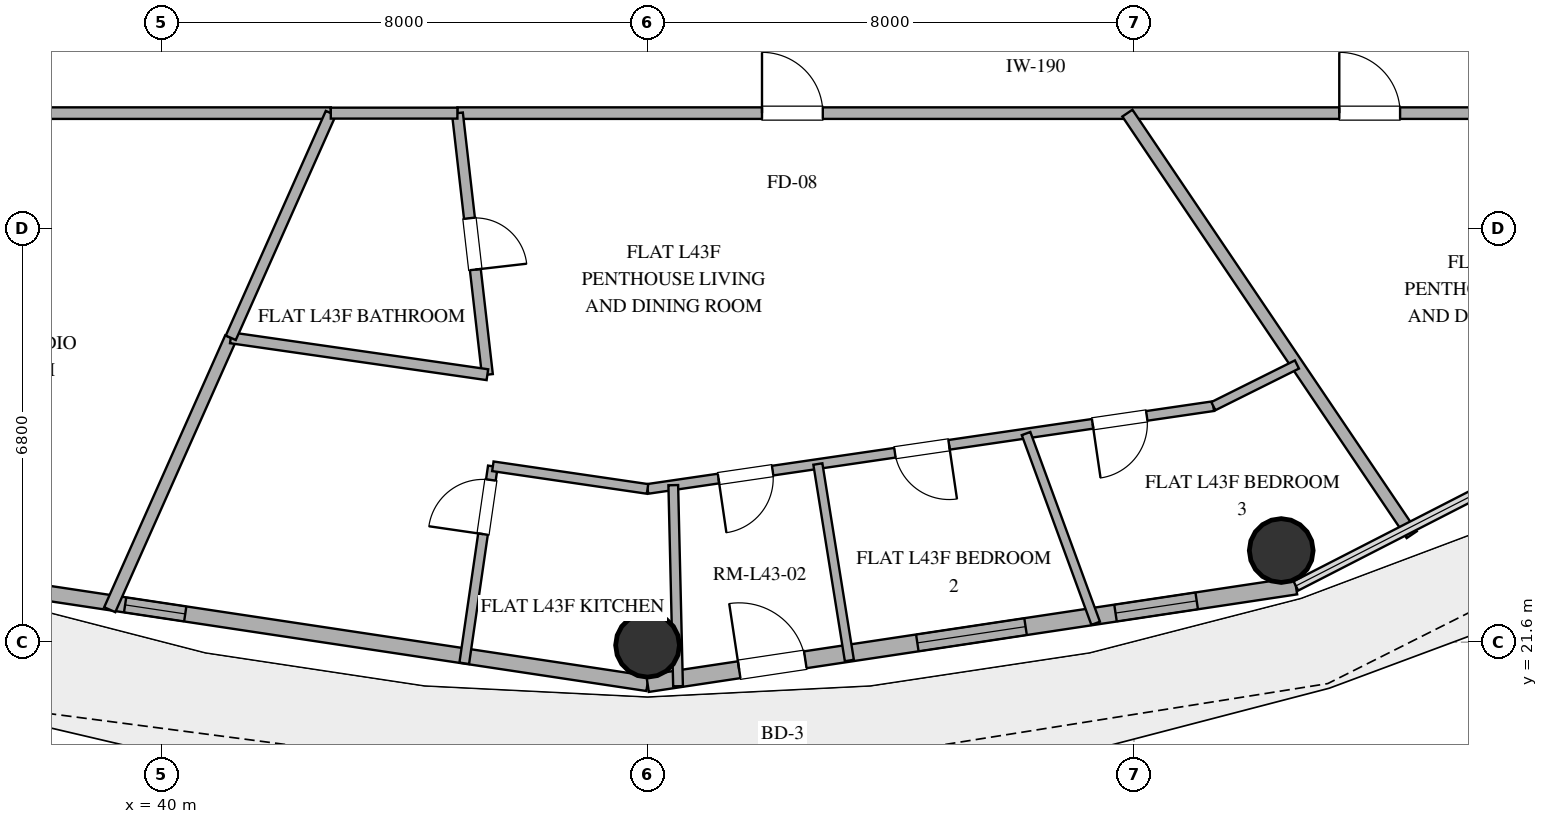
"""IFC4 building model, lengths in metres.
Left out: names, types, materials, properties, quantities, classifications, styles, units other than length and angle.
Written with IfcOpenShell. Run it as: python <this file> out.ifc"""

import sys

from ifc_helpers import new_model, si_unit, direction, frame, frame_2d, origin, origin_2d, place, context, subcontext, project, spatial, rectangle, hollow_circle, extrude, element, fill, save


model = new_model("IFC4")
c1 = context("Model", 3, precision=1e-05, world=origin(), true_north=direction((0.0, 1.0)))
c2 = subcontext(c1, "Body", "Model", "MODEL_VIEW")
j1 = project(units=[si_unit("LENGTHUNIT", "METRE"), si_unit("PLANEANGLEUNIT", "RADIAN")], contexts=[c1])
p1 = place(None, origin())
s1 = spatial("IfcSite", under=j1, at=p1, CompositionType="ELEMENT")
p2 = place(p1, origin())
s2 = spatial("IfcBuilding", under=s1, at=p2, CompositionType="ELEMENT")
p3 = place(p2, frame((0.0, 0.0, 172.2)))
s3 = spatial("IfcBuildingStorey", under=s2, at=p3, CompositionType="ELEMENT", Elevation=172.2)
for number, where, z_axis, x_axis in (
    (1, (48.0, 21.55, 0.0), (0.0, 0.0, 1.0), (1.0, 0.0, 0.0)),
    (2, (58.422, 23.107, 0.0), (0.0, 0.0, 1.0), (1.0, 0.0, 0.0)),
):
    element("IfcColumn", number, at=place(p3, frame(where, z_axis=z_axis, x_axis=x_axis)), inside=s3, PredefinedType="COLUMN", context=c2, shape_type="SweptSolid", body=[
        extrude(hollow_circle(Radius=0.525, WallThickness=0.028, at=origin_2d()), origin(), (0.0, 0.0, 1.0), 3.38),
    ])
p4 = place(p3, frame((37.337, 22.525, 0.0), z_axis=(0.0, 0.0, 1.0), x_axis=(0.988863993413, -0.148822049884, 0.0)))
e3 = element("IfcWall", 3, at=p4, inside=s3, PredefinedType="SOLIDWALL", context=c2, shape_type="SweptSolid", body=[
    extrude(rectangle(XDim=10.783, YDim=0.25, at=frame_2d((5.392, 0.0))), origin(), (0.0, 0.0, 1.0), 3.38),
])
p5 = place(p4, frame((2.094, 0.0, 0.35)))
e4 = element("IfcOpeningElement", 4, at=p5, cuts=e3, PredefinedType="OPENING", context=c2, shape_type="SweptSolid", body=[
    extrude(rectangle(XDim=1.0, YDim=1.05, at=frame_2d((0.5, 0.525))), frame((0.0, 0.135, 0.0), z_axis=(0.0, -1.0, 0.0), x_axis=(1.0, 0.0, 0.0)), (0.0, 0.0, 1.0), 0.27),
])
p6 = place(p3, frame((48.0, 20.92, 0.0), z_axis=(0.0, 0.0, 1.0), x_axis=(0.988863993413, 0.148822049884, 0.0)))
e5 = element("IfcWall", 5, at=p6, inside=s3, PredefinedType="SOLIDWALL", context=c2, shape_type="SweptSolid", body=[
    extrude(rectangle(XDim=10.783, YDim=0.28, at=frame_2d((5.392, 0.0))), origin(), (0.0, 0.0, 1.0), 3.38),
])
p7 = place(p6, frame((1.524, 0.0, 0.0)))
e6 = element("IfcOpeningElement", 6, at=p7, cuts=e5, PredefinedType="OPENING", context=c2, shape_type="SweptSolid", body=[
    extrude(rectangle(XDim=1.1, YDim=2.25, at=frame_2d((0.55, 1.125))), frame((0.0, 0.15, 0.0), z_axis=(0.0, -1.0, 0.0), x_axis=(1.0, 0.0, 0.0)), (0.0, 0.0, 1.0), 0.3),
])
p8 = place(p6, frame((4.487, 0.0, 0.85)))
e7 = element("IfcOpeningElement", 7, at=p8, cuts=e5, PredefinedType="OPENING", context=c2, shape_type="SweptSolid", body=[
    extrude(rectangle(XDim=1.8, YDim=2.2, at=frame_2d((0.9, 1.1))), frame((0.0, 0.15, 0.0), z_axis=(0.0, -1.0, 0.0), x_axis=(1.0, 0.0, 0.0)), (0.0, 0.0, 1.0), 0.3),
])
p9 = place(p6, frame((7.783, 0.0, 0.85)))
e8 = element("IfcOpeningElement", 8, at=p9, cuts=e5, PredefinedType="OPENING", context=c2, shape_type="SweptSolid", body=[
    extrude(rectangle(XDim=1.35, YDim=1.8, at=frame_2d((0.675, 0.9))), frame((0.0, 0.15, 0.0), z_axis=(0.0, -1.0, 0.0), x_axis=(1.0, 0.0, 0.0)), (0.0, 0.0, 1.0), 0.3),
])
p10 = place(p3, frame((44.873, 30.3, 0.0), z_axis=(0.0, 0.0, 1.0), x_axis=(1.0, 0.0, 0.0)))
e9 = element("IfcWall", 9, at=p10, inside=s3, PredefinedType="PARTITIONING", context=c2, shape_type="SweptSolid", body=[
    extrude(rectangle(XDim=19.027, YDim=0.19, at=frame_2d((9.514, 0.0))), origin(), (0.0, 0.0, 1.0), 2.74),
])
p11 = place(p10, frame((5.01, 0.0, 0.0)))
e10 = element("IfcOpeningElement", 10, at=p11, cuts=e9, PredefinedType="OPENING", context=c2, shape_type="SweptSolid", body=[
    extrude(rectangle(XDim=1.0, YDim=2.2, at=frame_2d((0.5, 1.1))), frame((0.0, 0.105, 0.0), z_axis=(0.0, -1.0, 0.0), x_axis=(1.0, 0.0, 0.0)), (0.0, 0.0, 1.0), 0.21),
])
p12 = place(p10, frame((14.504, 0.0, 0.0)))
e11 = element("IfcOpeningElement", 11, at=p12, cuts=e9, PredefinedType="OPENING", context=c2, shape_type="SweptSolid", body=[
    extrude(rectangle(XDim=1.0, YDim=2.2, at=frame_2d((0.5, 1.1))), frame((0.0, 0.105, 0.0), z_axis=(0.0, -1.0, 0.0), x_axis=(1.0, 0.0, 0.0)), (0.0, 0.0, 1.0), 0.21),
])
p13 = place(p3, frame((32.1, 30.3, 0.0), z_axis=(0.0, 0.0, 1.0), x_axis=(1.0, 0.0, 0.0)))
e12 = element("IfcWall", 12, at=p13, inside=s3, PredefinedType="PARTITIONING", context=c2, shape_type="SweptSolid", body=[
    extrude(rectangle(XDim=10.691, YDim=0.19, at=frame_2d((5.345, 0.0))), origin(), (0.0, 0.0, 1.0), 2.74),
])
p14 = place(p13, frame((4.845, 0.0, 0.0)))
e13 = element("IfcOpeningElement", 13, at=p14, cuts=e12, PredefinedType="OPENING", context=c2, shape_type="SweptSolid", body=[
    extrude(rectangle(XDim=1.0, YDim=2.2, at=frame_2d((0.5, 1.1))), frame((0.0, 0.105, 0.0), z_axis=(0.0, -1.0, 0.0), x_axis=(1.0, 0.0, 0.0)), (0.0, 0.0, 1.0), 0.21),
])
p15 = place(p3, frame((55.892, 30.3, 0.0), z_axis=(0.0, 0.0, 1.0), x_axis=(0.55918600376, -0.829042226427, 0.0)))
e14 = element("IfcWall", 14, at=p15, inside=s3, PredefinedType="PARTITIONING", context=c2, shape_type="SweptSolid", body=[
    extrude(rectangle(XDim=8.362, YDim=0.2, at=frame_2d((4.181, 0.0))), origin(), (0.0, 0.0, 1.0), 2.74),
])
p16 = place(p3, frame((39.155, 22.134, 0.0), z_axis=(0.0, 0.0, 1.0), x_axis=(0.406740050792, 0.913543940422, 0.0)))
e15 = element("IfcWall", 15, at=p16, inside=s3, PredefinedType="PARTITIONING", context=c2, shape_type="SweptSolid", body=[
    extrude(rectangle(XDim=4.894, YDim=0.2, at=frame_2d((2.447, 0.0))), origin(), (0.0, 0.0, 1.0), 2.74),
])
p17 = place(p3, frame((44.873, 30.3, 0.0), z_axis=(0.0, 0.0, 1.0), x_axis=(0.11390281129, -0.993491897088, 0.0)))
e16 = element("IfcWall", 16, at=p17, inside=s3, PredefinedType="PLUMBINGWALL", context=c2, shape_type="SweptSolid", body=[
    extrude(rectangle(XDim=4.33, YDim=0.18, at=frame_2d((2.165, 0.0))), origin(), (0.0, 0.0, 1.0), 2.74),
])
p18 = place(p17, frame((1.74, 0.0, 0.0)))
e17 = element("IfcOpeningElement", 17, at=p18, cuts=e16, PredefinedType="OPENING", context=c2, shape_type="SweptSolid", body=[
    extrude(rectangle(XDim=0.85, YDim=2.1, at=frame_2d((0.425, 1.05))), frame((0.0, 0.1, 0.0), z_axis=(0.0, -1.0, 0.0), x_axis=(1.0, 0.0, 0.0)), (0.0, 0.0, 1.0), 0.2),
])
p19 = place(p3, frame((45.366, 25.999, 0.0), z_axis=(0.0, 0.0, 1.0), x_axis=(-0.98982427769, 0.14229511339, 0.0)))
e18 = element("IfcWall", 18, at=p19, inside=s3, PredefinedType="PLUMBINGWALL", context=c2, shape_type="SweptSolid", body=[
    extrude(rectangle(XDim=4.264, YDim=0.18, at=frame_2d((2.132, 0.0))), origin(), (0.0, 0.0, 1.0), 2.74),
])
p20 = place(p3, frame((41.146, 26.605, 0.0), z_axis=(0.0, 0.0, 1.0), x_axis=(0.406732062562, 0.913547497005, 0.0)))
e19 = element("IfcWall", 19, at=p20, inside=s3, PredefinedType="PLUMBINGWALL", context=c2, shape_type="SweptSolid", body=[
    extrude(rectangle(XDim=4.044, YDim=0.18, at=frame_2d((2.022, 0.0))), origin(), (0.0, 0.0, 1.0), 2.74),
])
p21 = place(p3, frame((57.305, 25.481, 0.0), z_axis=(0.0, 0.0, 1.0), x_axis=(-0.989470950226, -0.144731609055, 0.0)))
e20 = element("IfcWall", 20, at=p21, inside=s3, PredefinedType="PLUMBINGWALL", context=c2, shape_type="SweptSolid", body=[
    extrude(rectangle(XDim=9.404, YDim=0.16, at=frame_2d((4.702, 0.0))), origin(), (0.0, 0.0, 1.0), 2.74),
])
p22 = place(p21, frame((4.393, 0.0, 0.0)))
e21 = element("IfcOpeningElement", 21, at=p22, cuts=e20, PredefinedType="OPENING", context=c2, shape_type="SweptSolid", body=[
    extrude(rectangle(XDim=0.9, YDim=2.1, at=frame_2d((0.45, 1.05))), frame((0.0, 0.09, 0.0), z_axis=(0.0, -1.0, 0.0), x_axis=(1.0, 0.0, 0.0)), (0.0, 0.0, 1.0), 0.18),
])
p23 = place(p21, frame((1.106, 0.0, 0.0)))
e22 = element("IfcOpeningElement", 22, at=p23, cuts=e20, PredefinedType="OPENING", context=c2, shape_type="SweptSolid", body=[
    extrude(rectangle(XDim=0.9, YDim=2.1, at=frame_2d((0.45, 1.05))), frame((0.0, 0.09, 0.0), z_axis=(0.0, -1.0, 0.0), x_axis=(1.0, 0.0, 0.0)), (0.0, 0.0, 1.0), 0.18),
])
p24 = place(p21, frame((7.325, 0.0, 0.0)))
e23 = element("IfcOpeningElement", 23, at=p24, cuts=e20, PredefinedType="OPENING", context=c2, shape_type="SweptSolid", body=[
    extrude(rectangle(XDim=0.9, YDim=2.1, at=frame_2d((0.45, 1.05))), frame((0.0, 0.09, 0.0), z_axis=(0.0, -1.0, 0.0), x_axis=(1.0, 0.0, 0.0)), (0.0, 0.0, 1.0), 0.18),
])
p25 = place(p3, frame((55.37, 21.91, 0.0), z_axis=(0.0, 0.0, 1.0), x_axis=(-0.344425148523, 0.938813781889, 0.0)))
e24 = element("IfcWall", 24, at=p25, inside=s3, PredefinedType="PARTITIONING", context=c2, shape_type="SweptSolid", body=[
    extrude(rectangle(XDim=3.324, YDim=0.15, at=frame_2d((1.662, 0.0))), origin(), (0.0, 0.0, 1.0), 2.74),
])
p26 = place(p3, frame((48.423, 24.182, 0.0), z_axis=(0.0, 0.0, 1.0), x_axis=(0.023765895275, -0.999717551222, 0.0)))
e25 = element("IfcWall", 25, at=p26, inside=s3, PredefinedType="PLUMBINGWALL", context=c2, shape_type="SweptSolid", body=[
    extrude(rectangle(XDim=3.308, YDim=0.16, at=frame_2d((1.654, 0.0))), origin(), (0.0, 0.0, 1.0), 2.74),
])
p27 = place(p3, frame((44.985, 21.252, 0.0), z_axis=(0.0, 0.0, 1.0), x_axis=(0.14376989574, 0.989611144379, 0.0)))
e26 = element("IfcWall", 26, at=p27, inside=s3, PredefinedType="PLUMBINGWALL", context=c2, shape_type="SweptSolid", body=[
    extrude(rectangle(XDim=3.274, YDim=0.16, at=frame_2d((1.637, 0.0))), origin(), (0.0, 0.0, 1.0), 2.74),
])
p28 = place(p27, frame((2.147, 0.0, 0.0)))
e27 = element("IfcOpeningElement", 27, at=p28, cuts=e26, PredefinedType="OPENING", context=c2, shape_type="SweptSolid", body=[
    extrude(rectangle(XDim=0.9, YDim=2.1, at=frame_2d((0.45, 1.05))), frame((0.0, 0.09, 0.0), z_axis=(0.0, -1.0, 0.0), x_axis=(1.0, 0.0, 0.0)), (0.0, 0.0, 1.0), 0.18),
])
p29 = place(p3, frame((51.319, 21.298, 0.0), z_axis=(0.0, 0.0, 1.0), x_axis=(-0.158287238469, 0.987393108209, 0.0)))
e28 = element("IfcWall", 28, at=p29, inside=s3, PredefinedType="PARTITIONING", context=c2, shape_type="SweptSolid", body=[
    extrude(rectangle(XDim=3.273, YDim=0.15, at=frame_2d((1.636, 0.0))), origin(), (0.0, 0.0, 1.0), 2.74),
])
p30 = place(p3, frame((45.456, 24.492, 0.0), z_axis=(0.0, 0.0, 1.0), x_axis=(0.989473006689, -0.144717549155, 0.0)))
e29 = element("IfcWall", 29, at=p30, inside=s3, PredefinedType="PLUMBINGWALL", context=c2, shape_type="SweptSolid", body=[
    extrude(rectangle(XDim=2.571, YDim=0.16, at=frame_2d((1.286, 0.0))), origin(), (0.0, 0.0, 1.0), 2.74),
])
p31 = place(p3, frame((42.791, 30.3, 0.0), z_axis=(0.0, 0.0, 1.0), x_axis=(1.0, 0.0, 0.0)))
e30 = element("IfcWall", 30, at=p31, inside=s3, PredefinedType="PLUMBINGWALL", context=c2, shape_type="SweptSolid", body=[
    extrude(rectangle(XDim=2.082, YDim=0.18, at=frame_2d((1.041, 0.0))), origin(), (0.0, 0.0, 1.0), 2.74),
])
p32 = place(p3, frame((57.305, 25.481, 0.0), z_axis=(0.0, 0.0, 1.0), x_axis=(0.89499854631, 0.446069055308, 0.0)))
e31 = element("IfcWall", 31, at=p32, inside=s3, PredefinedType="PARTITIONING", context=c2, shape_type="SweptSolid", body=[
    extrude(rectangle(XDim=1.536, YDim=0.15, at=frame_2d((0.768, 0.0))), origin(), (0.0, 0.0, 1.0), 2.74),
])
p33 = place(p7, origin())
e32 = element("IfcDoor", 32, at=p33, inside=s3, OperationType="SINGLE_SWING_LEFT", PredefinedType="DOOR", context=c2, shape_type="SweptSolid", body=[
    extrude(rectangle(XDim=1.1, YDim=2.25, at=frame_2d((0.55, 1.125))), frame((0.0, 0.025, 0.0), z_axis=(0.0, -1.0, 0.0), x_axis=(1.0, 0.0, 0.0)), (0.0, 0.0, 1.0), 0.05),
])
fill(e6, e32)
p34 = place(p8, origin())
e33 = element("IfcWindow", 33, at=p34, inside=s3, PartitioningType="SINGLE_PANEL", PredefinedType="WINDOW", context=c2, shape_type="SweptSolid", body=[
    extrude(rectangle(XDim=1.8, YDim=2.2, at=frame_2d((0.9, 1.1))), frame((0.0, 0.03, 0.0), z_axis=(0.0, -1.0, 0.0), x_axis=(1.0, 0.0, 0.0)), (0.0, 0.0, 1.0), 0.06),
])
fill(e7, e33)
p35 = place(p9, origin())
e34 = element("IfcWindow", 34, at=p35, inside=s3, PartitioningType="SINGLE_PANEL", PredefinedType="WINDOW", context=c2, shape_type="SweptSolid", body=[
    extrude(rectangle(XDim=1.35, YDim=1.8, at=frame_2d((0.675, 0.9))), frame((0.0, 0.03, 0.0), z_axis=(0.0, -1.0, 0.0), x_axis=(1.0, 0.0, 0.0)), (0.0, 0.0, 1.0), 0.06),
])
fill(e8, e34)
p36 = place(p5, origin())
e35 = element("IfcWindow", 35, at=p36, inside=s3, PartitioningType="SINGLE_PANEL", PredefinedType="WINDOW", context=c2, shape_type="SweptSolid", body=[
    extrude(rectangle(XDim=1.0, YDim=1.05, at=frame_2d((0.5, 0.525))), frame((0.0, 0.03, 0.0), z_axis=(0.0, -1.0, 0.0), x_axis=(1.0, 0.0, 0.0)), (0.0, 0.0, 1.0), 0.06),
])
fill(e4, e35)
p37 = place(p11, origin())
e36 = element("IfcDoor", 36, at=p37, inside=s3, OperationType="SINGLE_SWING_LEFT", PredefinedType="DOOR", context=c2, shape_type="SweptSolid", body=[
    extrude(rectangle(XDim=1.0, YDim=2.2, at=frame_2d((0.5, 1.1))), frame((0.0, 0.025, 0.0), z_axis=(0.0, -1.0, 0.0), x_axis=(1.0, 0.0, 0.0)), (0.0, 0.0, 1.0), 0.05),
])
fill(e10, e36)
p38 = place(p12, origin())
e37 = element("IfcDoor", 37, at=p38, inside=s3, OperationType="SINGLE_SWING_LEFT", PredefinedType="DOOR", context=c2, shape_type="SweptSolid", body=[
    extrude(rectangle(XDim=1.0, YDim=2.2, at=frame_2d((0.5, 1.1))), frame((0.0, 0.025, 0.0), z_axis=(0.0, -1.0, 0.0), x_axis=(1.0, 0.0, 0.0)), (0.0, 0.0, 1.0), 0.05),
])
fill(e11, e37)
p39 = place(p18, origin())
e38 = element("IfcDoor", 38, at=p39, inside=s3, OperationType="SINGLE_SWING_RIGHT", PredefinedType="DOOR", context=c2, shape_type="SweptSolid", body=[
    extrude(rectangle(XDim=0.85, YDim=2.1, at=frame_2d((0.425, 1.05))), frame((0.0, 0.025, 0.0), z_axis=(0.0, -1.0, 0.0), x_axis=(1.0, 0.0, 0.0)), (0.0, 0.0, 1.0), 0.05),
])
fill(e17, e38)
p40 = place(p22, origin())
e39 = element("IfcDoor", 39, at=p40, inside=s3, OperationType="SINGLE_SWING_LEFT", PredefinedType="DOOR", context=c2, shape_type="SweptSolid", body=[
    extrude(rectangle(XDim=0.9, YDim=2.1, at=frame_2d((0.45, 1.05))), frame((0.0, 0.025, 0.0), z_axis=(0.0, -1.0, 0.0), x_axis=(1.0, 0.0, 0.0)), (0.0, 0.0, 1.0), 0.05),
])
fill(e21, e39)
p41 = place(p23, origin())
e40 = element("IfcDoor", 40, at=p41, inside=s3, OperationType="SINGLE_SWING_RIGHT", PredefinedType="DOOR", context=c2, shape_type="SweptSolid", body=[
    extrude(rectangle(XDim=0.9, YDim=2.1, at=frame_2d((0.45, 1.05))), frame((0.0, 0.025, 0.0), z_axis=(0.0, -1.0, 0.0), x_axis=(1.0, 0.0, 0.0)), (0.0, 0.0, 1.0), 0.05),
])
fill(e22, e40)
p42 = place(p24, origin())
e41 = element("IfcDoor", 41, at=p42, inside=s3, OperationType="SINGLE_SWING_RIGHT", PredefinedType="DOOR", context=c2, shape_type="SweptSolid", body=[
    extrude(rectangle(XDim=0.9, YDim=2.1, at=frame_2d((0.45, 1.05))), frame((0.0, 0.025, 0.0), z_axis=(0.0, -1.0, 0.0), x_axis=(1.0, 0.0, 0.0)), (0.0, 0.0, 1.0), 0.05),
])
fill(e23, e41)
p43 = place(p28, origin())
e42 = element("IfcDoor", 42, at=p43, inside=s3, OperationType="SINGLE_SWING_LEFT", PredefinedType="DOOR", context=c2, shape_type="SweptSolid", body=[
    extrude(rectangle(XDim=0.9, YDim=2.1, at=frame_2d((0.45, 1.05))), frame((0.0, 0.025, 0.0), z_axis=(0.0, -1.0, 0.0), x_axis=(1.0, 0.0, 0.0)), (0.0, 0.0, 1.0), 0.05),
])
fill(e27, e42)
save(model, sys.argv[1])
